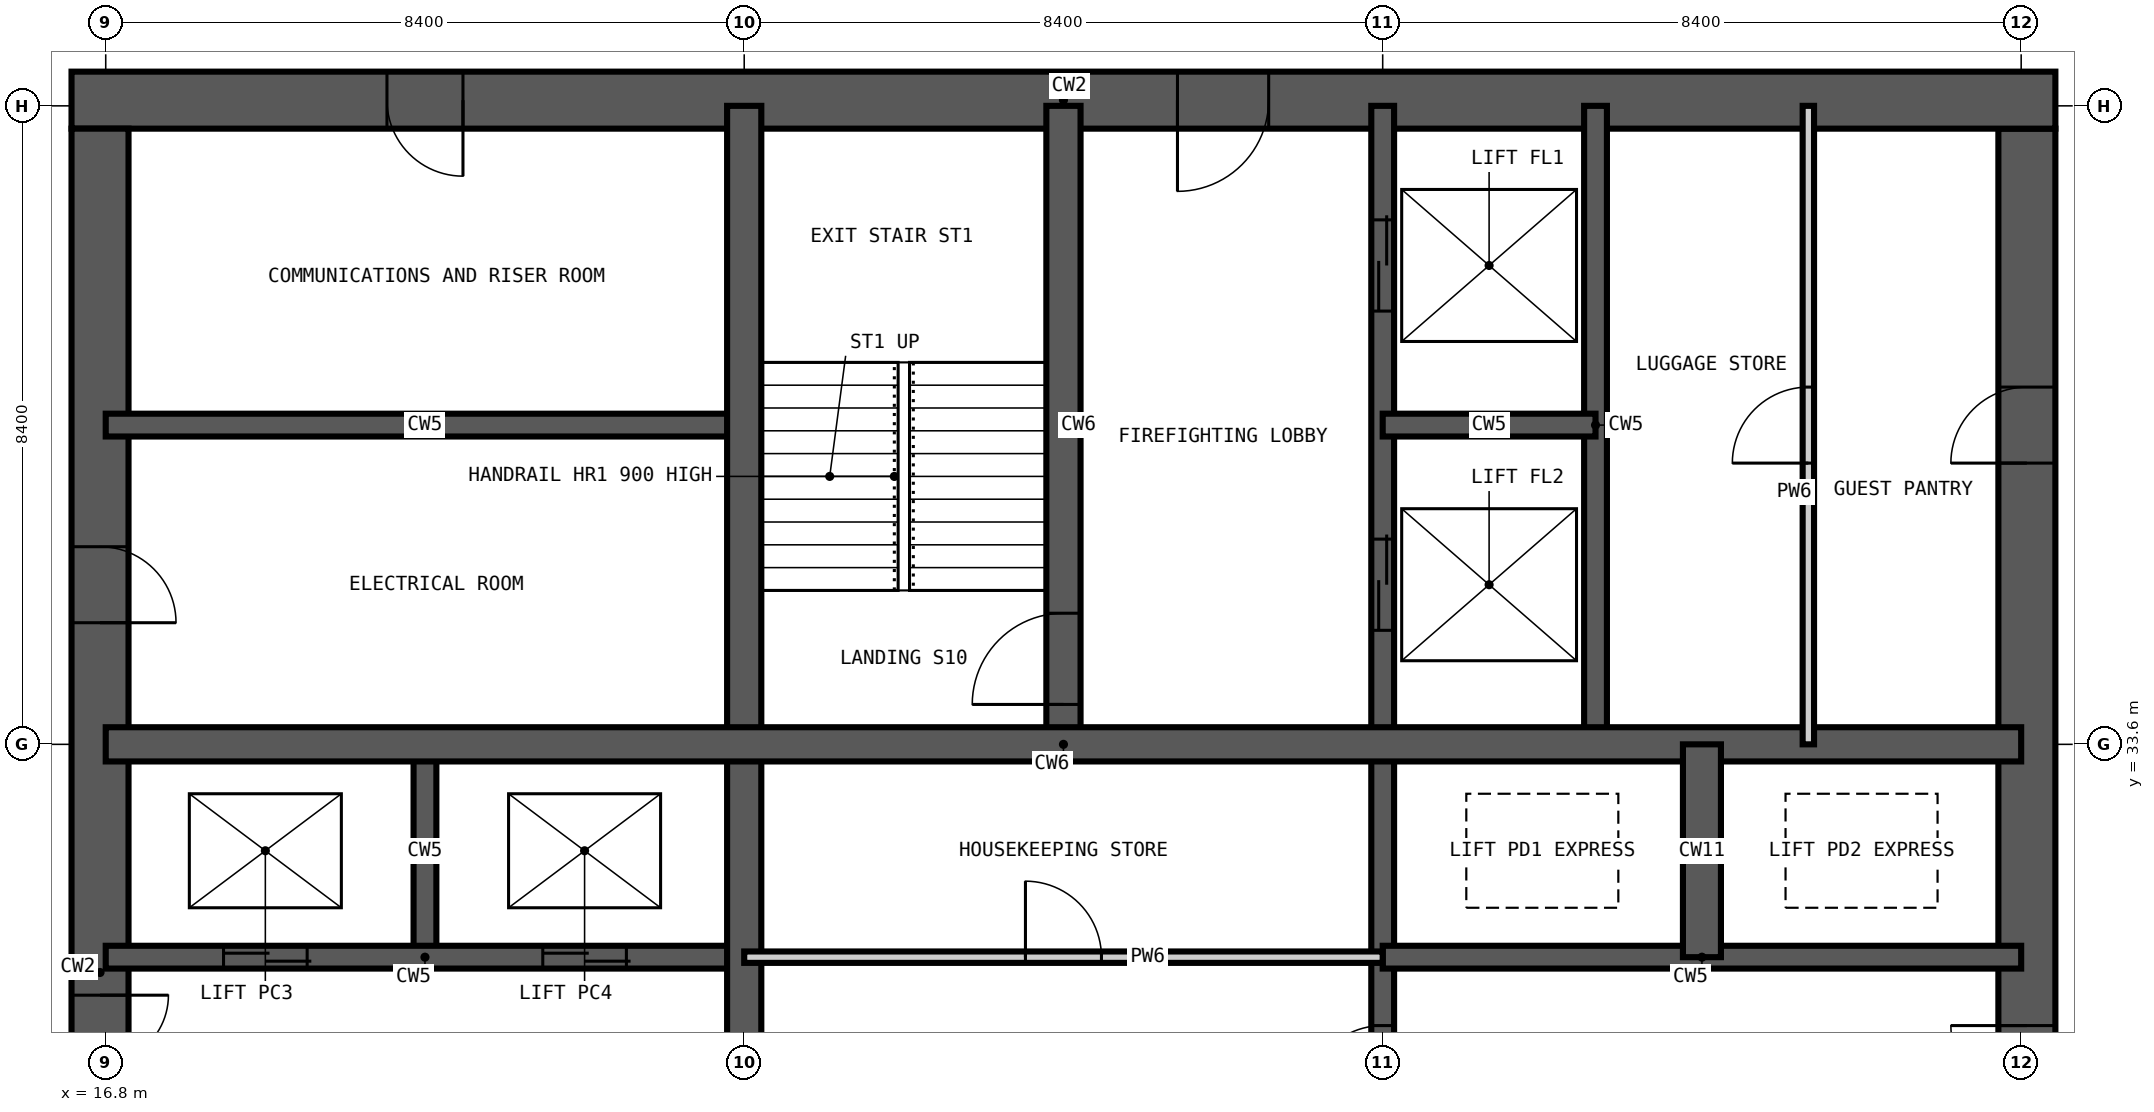
"""IFC4 building model, lengths in metres.
Left out: names, types, materials, properties, quantities, classifications, styles, units other than length and angle.
Written with IfcOpenShell. Run it as: python <this file> out.ifc"""

import sys

from ifc_helpers import new_model, si_unit, direction, frame, frame_2d, origin, place, context, subcontext, project, spatial, rectangle, extrude, element, fill, save


model = new_model("IFC4")
c1 = context("Model", 3, precision=1e-05, world=origin(), true_north=direction((0.0, 1.0)))
c2 = subcontext(c1, "Body", "Model", "MODEL_VIEW")
j1 = project(units=[si_unit("LENGTHUNIT", "METRE"), si_unit("PLANEANGLEUNIT", "RADIAN")], contexts=[c1])
p1 = place(None, origin())
s1 = spatial("IfcSite", under=j1, at=p1, CompositionType="ELEMENT")
p2 = place(p1, origin())
s2 = spatial("IfcBuilding", under=s1, at=p2, CompositionType="ELEMENT")
p3 = place(p2, frame((0.0, 0.0, 177.0)))
s3 = spatial("IfcBuildingStorey", under=s2, at=p3, CompositionType="ELEMENT", Elevation=177.0)
p4 = place(p3, frame((42.075, 17.1, -0.35), z_axis=(0.0, 0.0, 1.0), x_axis=(0.0, 1.0, 0.0)))
e1 = element("IfcWall", 1, at=p4, inside=s3, PredefinedType="SHEAR", context=c2, shape_type="SweptSolid", body=[
    extrude(rectangle(XDim=24.6, YDim=0.75, at=frame_2d((12.3, 0.0))), origin(), (0.0, 0.0, 1.0), 3.6),
])
p5 = place(p4, frame((0.5, 0.0, 0.35)))
e2 = element("IfcOpeningElement", 2, at=p5, cuts=e1, PredefinedType="OPENING", context=c2, shape_type="SweptSolid", body=[
    extrude(rectangle(XDim=1.2, YDim=2.2, at=frame_2d((0.6, 1.1))), frame((0.0, 0.385, 0.0), z_axis=(0.0, -1.0, 0.0), x_axis=(1.0, 0.0, 0.0)), (0.0, 0.0, 1.0), 0.77),
])
p6 = place(p4, frame((11.8, 0.0, 0.35)))
e3 = element("IfcOpeningElement", 3, at=p6, cuts=e1, PredefinedType="OPENING", context=c2, shape_type="SweptSolid", body=[
    extrude(rectangle(XDim=1.0, YDim=2.1, at=frame_2d((0.5, 1.05))), frame((0.0, 0.385, 0.0), z_axis=(0.0, -1.0, 0.0), x_axis=(1.0, 0.0, 0.0)), (0.0, 0.0, 1.0), 0.77),
])
p7 = place(p4, frame((20.2, 0.0, 0.35)))
e4 = element("IfcOpeningElement", 4, at=p7, cuts=e1, PredefinedType="OPENING", context=c2, shape_type="SweptSolid", body=[
    extrude(rectangle(XDim=1.0, YDim=2.1, at=frame_2d((0.5, 1.05))), frame((0.0, 0.385, 0.0), z_axis=(0.0, -1.0, 0.0), x_axis=(1.0, 0.0, 0.0)), (0.0, 0.0, 1.0), 0.77),
])
p8 = place(p3, frame((42.45, 42.075, -0.35), z_axis=(0.0, 0.0, 1.0), x_axis=(-1.0, 0.0, 0.0)))
e5 = element("IfcWall", 5, at=p8, inside=s3, PredefinedType="SHEAR", context=c2, shape_type="SweptSolid", body=[
    extrude(rectangle(XDim=26.1, YDim=0.75, at=frame_2d((13.05, 0.0))), origin(), (0.0, 0.0, 1.0), 3.6),
])
p9 = place(p8, frame((20.95, 0.0, 0.35)))
e6 = element("IfcOpeningElement", 6, at=p9, cuts=e5, PredefinedType="OPENING", context=c2, shape_type="SweptSolid", body=[
    extrude(rectangle(XDim=1.0, YDim=2.1, at=frame_2d((0.5, 1.05))), frame((0.0, 0.385, 0.0), z_axis=(0.0, -1.0, 0.0), x_axis=(1.0, 0.0, 0.0)), (0.0, 0.0, 1.0), 0.77),
])
p10 = place(p8, frame((10.35, 0.0, 0.35)))
e7 = element("IfcOpeningElement", 7, at=p10, cuts=e5, PredefinedType="OPENING", context=c2, shape_type="SweptSolid", body=[
    extrude(rectangle(XDim=1.2, YDim=2.2, at=frame_2d((0.6, 1.1))), frame((0.0, 0.385, 0.0), z_axis=(0.0, -1.0, 0.0), x_axis=(1.0, 0.0, 0.0)), (0.0, 0.0, 1.0), 0.77),
])
p11 = place(p3, frame((16.725, 41.7, -0.35), z_axis=(0.0, 0.0, 1.0), x_axis=(0.0, -1.0, 0.0)))
e8 = element("IfcWall", 8, at=p11, inside=s3, PredefinedType="SHEAR", context=c2, shape_type="SweptSolid", body=[
    extrude(rectangle(XDim=24.6, YDim=0.75, at=frame_2d((12.3, 0.0))), origin(), (0.0, 0.0, 1.0), 3.6),
])
p12 = place(p11, frame((11.4, 0.0, 0.35)))
e9 = element("IfcOpeningElement", 9, at=p12, cuts=e8, PredefinedType="OPENING", context=c2, shape_type="SweptSolid", body=[
    extrude(rectangle(XDim=1.8, YDim=2.2, at=frame_2d((0.9, 1.1))), frame((0.0, 0.385, 0.0), z_axis=(0.0, -1.0, 0.0), x_axis=(1.0, 0.0, 0.0)), (0.0, 0.0, 1.0), 0.77),
])
p13 = place(p11, frame((20.2, 0.0, 0.35)))
e10 = element("IfcOpeningElement", 10, at=p13, cuts=e8, PredefinedType="OPENING", context=c2, shape_type="SweptSolid", body=[
    extrude(rectangle(XDim=1.0, YDim=2.1, at=frame_2d((0.5, 1.05))), frame((0.0, 0.385, 0.0), z_axis=(0.0, -1.0, 0.0), x_axis=(1.0, 0.0, 0.0)), (0.0, 0.0, 1.0), 0.77),
])
p14 = place(p11, frame((5.5, 0.0, 0.35)))
e11 = element("IfcOpeningElement", 11, at=p14, cuts=e8, PredefinedType="OPENING", context=c2, shape_type="SweptSolid", body=[
    extrude(rectangle(XDim=1.0, YDim=2.1, at=frame_2d((0.5, 1.05))), frame((0.0, 0.385, 0.0), z_axis=(0.0, -1.0, 0.0), x_axis=(1.0, 0.0, 0.0)), (0.0, 0.0, 1.0), 0.77),
])
p15 = place(p3, frame((21.0, 30.8, -0.35), z_axis=(0.0, 0.0, 1.0), x_axis=(0.0, 1.0, 0.0)))
e12 = element("IfcWall", 12, at=p15, inside=s3, PredefinedType="SHEAR", context=c2, shape_type="SweptSolid", body=[
    extrude(rectangle(XDim=2.8, YDim=0.3, at=frame_2d((1.4, 0.0))), origin(), (0.0, 0.0, 1.0), 3.6),
])
p16 = place(p3, frame((33.6, 16.8, -0.35), z_axis=(0.0, 0.0, 1.0), x_axis=(0.0, 1.0, 0.0)))
e13 = element("IfcWall", 13, at=p16, inside=s3, PredefinedType="SHEAR", context=c2, shape_type="SweptSolid", body=[
    extrude(rectangle(XDim=25.2, YDim=0.3, at=frame_2d((12.6, 0.0))), origin(), (0.0, 0.0, 1.0), 3.6),
])
p17 = place(p16, frame((22.5, 0.0, 0.35)))
e14 = element("IfcOpeningElement", 14, at=p17, cuts=e13, PredefinedType="OPENING", context=c2, shape_type="SweptSolid", body=[
    extrude(rectangle(XDim=1.2, YDim=2.2, at=frame_2d((0.6, 1.1))), frame((0.0, 0.16, 0.0), z_axis=(0.0, -1.0, 0.0), x_axis=(1.0, 0.0, 0.0)), (0.0, 0.0, 1.0), 0.32),
])
p18 = place(p16, frame((18.3, 0.0, 0.35)))
e15 = element("IfcOpeningElement", 15, at=p18, cuts=e13, PredefinedType="OPENING", context=c2, shape_type="SweptSolid", body=[
    extrude(rectangle(XDim=1.2, YDim=2.2, at=frame_2d((0.6, 1.1))), frame((0.0, 0.16, 0.0), z_axis=(0.0, -1.0, 0.0), x_axis=(1.0, 0.0, 0.0)), (0.0, 0.0, 1.0), 0.32),
])
p19 = place(p16, frame((12.1, 0.0, 0.35)))
e16 = element("IfcOpeningElement", 16, at=p19, cuts=e13, PredefinedType="OPENING", context=c2, shape_type="SweptSolid", body=[
    extrude(rectangle(XDim=1.0, YDim=2.1, at=frame_2d((0.5, 1.05))), frame((0.0, 0.16, 0.0), z_axis=(0.0, -1.0, 0.0), x_axis=(1.0, 0.0, 0.0)), (0.0, 0.0, 1.0), 0.32),
])
p20 = place(p3, frame((36.4, 33.6, -0.35), z_axis=(0.0, 0.0, 1.0), x_axis=(0.0, 1.0, 0.0)))
e17 = element("IfcWall", 17, at=p20, inside=s3, PredefinedType="SHEAR", context=c2, shape_type="SweptSolid", body=[
    extrude(rectangle(XDim=8.4, YDim=0.3, at=frame_2d((4.2, 0.0))), origin(), (0.0, 0.0, 1.0), 3.6),
])
p21 = place(p3, frame((16.8, 30.8, -0.35), z_axis=(0.0, 0.0, 1.0), x_axis=(1.0, 0.0, 0.0)))
e18 = element("IfcWall", 18, at=p21, inside=s3, PredefinedType="SHEAR", context=c2, shape_type="SweptSolid", body=[
    extrude(rectangle(XDim=8.4, YDim=0.3, at=frame_2d((4.2, 0.0))), origin(), (0.0, 0.0, 1.0), 3.6),
])
p22 = place(p21, frame((1.55, 0.0, 0.35)))
e19 = element("IfcOpeningElement", 19, at=p22, cuts=e18, PredefinedType="OPENING", context=c2, shape_type="SweptSolid", body=[
    extrude(rectangle(XDim=1.1, YDim=2.2, at=frame_2d((0.55, 1.1))), frame((0.0, 0.16, 0.0), z_axis=(0.0, -1.0, 0.0), x_axis=(1.0, 0.0, 0.0)), (0.0, 0.0, 1.0), 0.32),
])
p23 = place(p21, frame((5.75, 0.0, 0.35)))
e20 = element("IfcOpeningElement", 20, at=p23, cuts=e18, PredefinedType="OPENING", context=c2, shape_type="SweptSolid", body=[
    extrude(rectangle(XDim=1.1, YDim=2.2, at=frame_2d((0.55, 1.1))), frame((0.0, 0.16, 0.0), z_axis=(0.0, -1.0, 0.0), x_axis=(1.0, 0.0, 0.0)), (0.0, 0.0, 1.0), 0.32),
])
for number, where, z_axis, x_axis in (
    (21, (33.6, 30.8, -0.35), (0.0, 0.0, 1.0), (1.0, 0.0, 0.0)),
    (22, (16.8, 37.8, -0.35), (0.0, 0.0, 1.0), (1.0, 0.0, 0.0)),
):
    element("IfcWall", number, at=place(p3, frame(where, z_axis=z_axis, x_axis=x_axis)), inside=s3, PredefinedType="SHEAR", context=c2, shape_type="SweptSolid", body=[
        extrude(rectangle(XDim=8.4, YDim=0.3, at=frame_2d((4.2, 0.0))), origin(), (0.0, 0.0, 1.0), 3.6),
    ])
p24 = place(p3, frame((33.6, 37.8, -0.35), z_axis=(0.0, 0.0, 1.0), x_axis=(1.0, 0.0, 0.0)))
e23 = element("IfcWall", 23, at=p24, inside=s3, PredefinedType="SHEAR", context=c2, shape_type="SweptSolid", body=[
    extrude(rectangle(XDim=2.8, YDim=0.3, at=frame_2d((1.4, 0.0))), origin(), (0.0, 0.0, 1.0), 3.6),
])
p25 = place(p3, frame((25.2, 16.8, -0.35), z_axis=(0.0, 0.0, 1.0), x_axis=(0.0, 1.0, 0.0)))
e24 = element("IfcWall", 24, at=p25, inside=s3, PredefinedType="SHEAR", context=c2, shape_type="SweptSolid", body=[
    extrude(rectangle(XDim=25.2, YDim=0.45, at=frame_2d((12.6, 0.0))), origin(), (0.0, 0.0, 1.0), 3.6),
])
p26 = place(p3, frame((29.4, 33.6, -0.35), z_axis=(0.0, 0.0, 1.0), x_axis=(0.0, 1.0, 0.0)))
e25 = element("IfcWall", 25, at=p26, inside=s3, PredefinedType="SHEAR", context=c2, shape_type="SweptSolid", body=[
    extrude(rectangle(XDim=8.4, YDim=0.45, at=frame_2d((4.2, 0.0))), origin(), (0.0, 0.0, 1.0), 3.6),
])
p27 = place(p26, frame((0.525, 0.0, 0.35)))
e26 = element("IfcOpeningElement", 26, at=p27, cuts=e25, PredefinedType="OPENING", context=c2, shape_type="SweptSolid", body=[
    extrude(rectangle(XDim=1.2, YDim=2.2, at=frame_2d((0.6, 1.1))), frame((0.0, 0.235, 0.0), z_axis=(0.0, -1.0, 0.0), x_axis=(1.0, 0.0, 0.0)), (0.0, 0.0, 1.0), 0.47),
])
p28 = place(p3, frame((16.8, 33.6, -0.35), z_axis=(0.0, 0.0, 1.0), x_axis=(1.0, 0.0, 0.0)))
e27 = element("IfcWall", 27, at=p28, inside=s3, PredefinedType="SHEAR", context=c2, shape_type="SweptSolid", body=[
    extrude(rectangle(XDim=25.2, YDim=0.45, at=frame_2d((12.6, 0.0))), origin(), (0.0, 0.0, 1.0), 3.6),
])
p29 = place(p3, frame((37.8, 30.8, -0.35), z_axis=(0.0, 0.0, 1.0), x_axis=(0.0, 1.0, 0.0)))
e28 = element("IfcWall", 28, at=p29, inside=s3, PredefinedType="SHEAR", context=c2, shape_type="SweptSolid", body=[
    extrude(rectangle(XDim=2.8, YDim=0.5, at=frame_2d((1.4, 0.0))), origin(), (0.0, 0.0, 1.0), 3.6),
])
p30 = place(p3, frame((39.2, 33.6, 0.0), z_axis=(0.0, 0.0, 1.0), x_axis=(0.0, 1.0, 0.0)))
e29 = element("IfcWall", 29, at=p30, inside=s3, PredefinedType="PARTITIONING", context=c2, shape_type="SweptSolid", body=[
    extrude(rectangle(XDim=8.4, YDim=0.15, at=frame_2d((4.2, 0.0))), origin(), (0.0, 0.0, 1.0), 3.25),
])
p31 = place(p30, frame((3.7, 0.0, 0.0)))
e30 = element("IfcOpeningElement", 30, at=p31, cuts=e29, PredefinedType="OPENING", context=c2, shape_type="SweptSolid", body=[
    extrude(rectangle(XDim=1.0, YDim=2.1, at=frame_2d((0.5, 1.05))), frame((0.0, 0.085, 0.0), z_axis=(0.0, -1.0, 0.0), x_axis=(1.0, 0.0, 0.0)), (0.0, 0.0, 1.0), 0.17),
])
p32 = place(p3, frame((25.2, 30.8, 0.0), z_axis=(0.0, 0.0, 1.0), x_axis=(1.0, 0.0, 0.0)))
e31 = element("IfcWall", 31, at=p32, inside=s3, PredefinedType="PARTITIONING", context=c2, shape_type="SweptSolid", body=[
    extrude(rectangle(XDim=8.4, YDim=0.15, at=frame_2d((4.2, 0.0))), origin(), (0.0, 0.0, 1.0), 3.25),
])
p33 = place(p32, frame((3.7, 0.0, 0.0)))
e32 = element("IfcOpeningElement", 32, at=p33, cuts=e31, PredefinedType="OPENING", context=c2, shape_type="SweptSolid", body=[
    extrude(rectangle(XDim=1.0, YDim=2.1, at=frame_2d((0.5, 1.05))), frame((0.0, 0.085, 0.0), z_axis=(0.0, -1.0, 0.0), x_axis=(1.0, 0.0, 0.0)), (0.0, 0.0, 1.0), 0.17),
])
p34 = place(p27, origin())
e33 = element("IfcDoor", 33, at=p34, inside=s3, OperationType="SINGLE_SWING_LEFT", PredefinedType="DOOR", context=c2, shape_type="SweptSolid", body=[
    extrude(rectangle(XDim=1.2, YDim=2.2, at=frame_2d((0.6, 1.1))), frame((0.0, 0.025, 0.0), z_axis=(0.0, -1.0, 0.0), x_axis=(1.0, 0.0, 0.0)), (0.0, 0.0, 1.0), 0.05),
])
fill(e26, e33)
p35 = place(p22, origin())
e34 = element("IfcDoor", 34, at=p35, inside=s3, OperationType="DOUBLE_DOOR_SLIDING", PredefinedType="DOOR", context=c2, shape_type="SweptSolid", body=[
    extrude(rectangle(XDim=1.1, YDim=2.2, at=frame_2d((0.55, 1.1))), frame((0.0, 0.025, 0.0), z_axis=(0.0, -1.0, 0.0), x_axis=(1.0, 0.0, 0.0)), (0.0, 0.0, 1.0), 0.05),
])
fill(e19, e34)
p36 = place(p23, origin())
e35 = element("IfcDoor", 35, at=p36, inside=s3, OperationType="DOUBLE_DOOR_SLIDING", PredefinedType="DOOR", context=c2, shape_type="SweptSolid", body=[
    extrude(rectangle(XDim=1.1, YDim=2.2, at=frame_2d((0.55, 1.1))), frame((0.0, 0.025, 0.0), z_axis=(0.0, -1.0, 0.0), x_axis=(1.0, 0.0, 0.0)), (0.0, 0.0, 1.0), 0.05),
])
fill(e20, e35)
p37 = place(p17, origin())
e36 = element("IfcDoor", 36, at=p37, inside=s3, OperationType="DOUBLE_DOOR_SLIDING", PredefinedType="DOOR", context=c2, shape_type="SweptSolid", body=[
    extrude(rectangle(XDim=1.2, YDim=2.2, at=frame_2d((0.6, 1.1))), frame((0.0, 0.025, 0.0), z_axis=(0.0, -1.0, 0.0), x_axis=(1.0, 0.0, 0.0)), (0.0, 0.0, 1.0), 0.05),
])
fill(e14, e36)
p38 = place(p18, origin())
e37 = element("IfcDoor", 37, at=p38, inside=s3, OperationType="DOUBLE_DOOR_SLIDING", PredefinedType="DOOR", context=c2, shape_type="SweptSolid", body=[
    extrude(rectangle(XDim=1.2, YDim=2.2, at=frame_2d((0.6, 1.1))), frame((0.0, 0.025, 0.0), z_axis=(0.0, -1.0, 0.0), x_axis=(1.0, 0.0, 0.0)), (0.0, 0.0, 1.0), 0.05),
])
fill(e15, e37)
p39 = place(p12, origin())
e38 = element("IfcDoor", 38, at=p39, inside=s3, OperationType="DOUBLE_DOOR_DOUBLE_SWING", PredefinedType="DOOR", context=c2, shape_type="SweptSolid", body=[
    extrude(rectangle(XDim=1.8, YDim=2.2, at=frame_2d((0.9, 1.1))), frame((0.0, 0.025, 0.0), z_axis=(0.0, -1.0, 0.0), x_axis=(1.0, 0.0, 0.0)), (0.0, 0.0, 1.0), 0.05),
])
fill(e9, e38)
p40 = place(p14, origin())
e39 = element("IfcDoor", 39, at=p40, inside=s3, OperationType="SINGLE_SWING_RIGHT", PredefinedType="DOOR", context=c2, shape_type="SweptSolid", body=[
    extrude(rectangle(XDim=1.0, YDim=2.1, at=frame_2d((0.5, 1.05))), frame((0.0, 0.025, 0.0), z_axis=(0.0, -1.0, 0.0), x_axis=(1.0, 0.0, 0.0)), (0.0, 0.0, 1.0), 0.05),
])
fill(e11, e39)
p41 = place(p9, origin())
e40 = element("IfcDoor", 40, at=p41, inside=s3, OperationType="SINGLE_SWING_LEFT", PredefinedType="DOOR", context=c2, shape_type="SweptSolid", body=[
    extrude(rectangle(XDim=1.0, YDim=2.1, at=frame_2d((0.5, 1.05))), frame((0.0, 0.025, 0.0), z_axis=(0.0, -1.0, 0.0), x_axis=(1.0, 0.0, 0.0)), (0.0, 0.0, 1.0), 0.05),
])
fill(e6, e40)
p42 = place(p19, origin())
e41 = element("IfcDoor", 41, at=p42, inside=s3, OperationType="SINGLE_SWING_LEFT", PredefinedType="DOOR", context=c2, shape_type="SweptSolid", body=[
    extrude(rectangle(XDim=1.0, YDim=2.1, at=frame_2d((0.5, 1.05))), frame((0.0, 0.025, 0.0), z_axis=(0.0, -1.0, 0.0), x_axis=(1.0, 0.0, 0.0)), (0.0, 0.0, 1.0), 0.05),
])
fill(e16, e41)
p43 = place(p33, origin())
e42 = element("IfcDoor", 42, at=p43, inside=s3, OperationType="SINGLE_SWING_LEFT", PredefinedType="DOOR", context=c2, shape_type="SweptSolid", body=[
    extrude(rectangle(XDim=1.0, YDim=2.1, at=frame_2d((0.5, 1.05))), frame((0.0, 0.025, 0.0), z_axis=(0.0, -1.0, 0.0), x_axis=(1.0, 0.0, 0.0)), (0.0, 0.0, 1.0), 0.05),
])
fill(e32, e42)
p44 = place(p6, origin())
e43 = element("IfcDoor", 43, at=p44, inside=s3, OperationType="SINGLE_SWING_RIGHT", PredefinedType="DOOR", context=c2, shape_type="SweptSolid", body=[
    extrude(rectangle(XDim=1.0, YDim=2.1, at=frame_2d((0.5, 1.05))), frame((0.0, 0.025, 0.0), z_axis=(0.0, -1.0, 0.0), x_axis=(1.0, 0.0, 0.0)), (0.0, 0.0, 1.0), 0.05),
])
fill(e3, e43)
p45 = place(p10, origin())
e44 = element("IfcDoor", 44, at=p45, inside=s3, OperationType="SINGLE_SWING_RIGHT", PredefinedType="DOOR", context=c2, shape_type="SweptSolid", body=[
    extrude(rectangle(XDim=1.2, YDim=2.2, at=frame_2d((0.6, 1.1))), frame((0.0, 0.025, 0.0), z_axis=(0.0, -1.0, 0.0), x_axis=(1.0, 0.0, 0.0)), (0.0, 0.0, 1.0), 0.05),
])
fill(e7, e44)
p46 = place(p7, origin())
e45 = element("IfcDoor", 45, at=p46, inside=s3, OperationType="SINGLE_SWING_LEFT", PredefinedType="DOOR", context=c2, shape_type="SweptSolid", body=[
    extrude(rectangle(XDim=1.0, YDim=2.1, at=frame_2d((0.5, 1.05))), frame((0.0, 0.025, 0.0), z_axis=(0.0, -1.0, 0.0), x_axis=(1.0, 0.0, 0.0)), (0.0, 0.0, 1.0), 0.05),
])
fill(e4, e45)
p47 = place(p31, origin())
e46 = element("IfcDoor", 46, at=p47, inside=s3, OperationType="SINGLE_SWING_LEFT", PredefinedType="DOOR", context=c2, shape_type="SweptSolid", body=[
    extrude(rectangle(XDim=1.0, YDim=2.1, at=frame_2d((0.5, 1.05))), frame((0.0, 0.025, 0.0), z_axis=(0.0, -1.0, 0.0), x_axis=(1.0, 0.0, 0.0)), (0.0, 0.0, 1.0), 0.05),
])
fill(e30, e46)
save(model, sys.argv[1])
